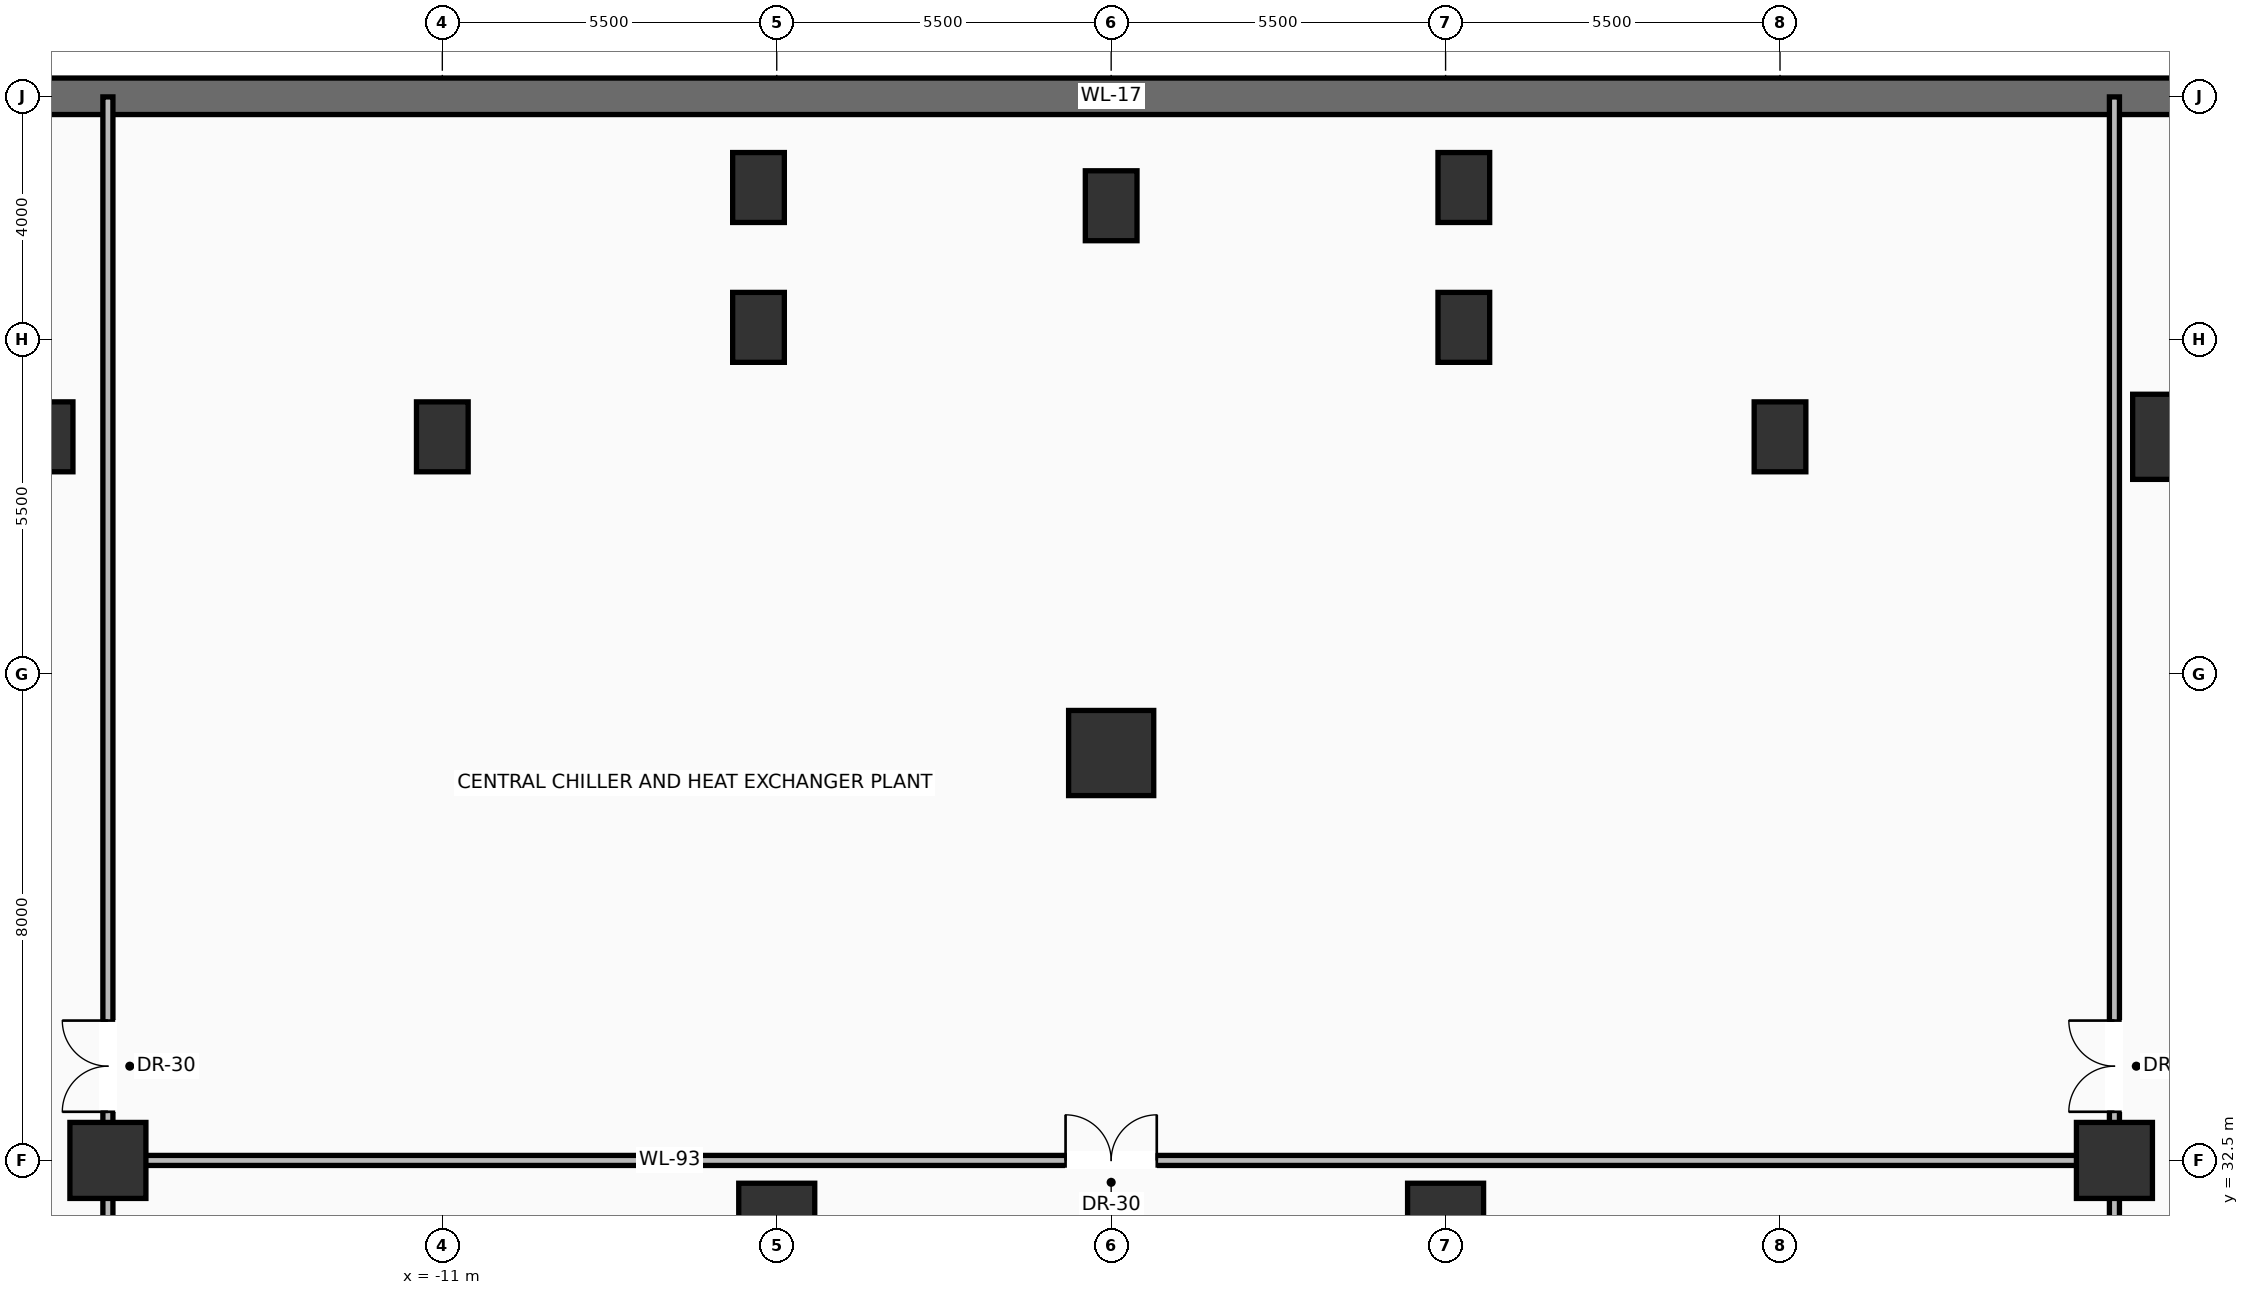
"""IFC4 building model, lengths in metres.
Left out: names, types, materials, properties, quantities, classifications, styles, units other than length and angle.
Written with IfcOpenShell. Run it as: python <this file> out.ifc"""

import sys

from ifc_helpers import new_model, si_unit, direction, frame, frame_2d, origin, origin_2d, place, context, subcontext, project, spatial, rectangle, hollow_rectangle, extrude, source, transform, mapped, element, fill, save


model = new_model("IFC4")
c1 = context("Model", 3, precision=1e-05, world=origin(), true_north=direction((0.0, 1.0)))
c2 = subcontext(c1, "Body", "Model", "MODEL_VIEW")
j1 = project(units=[si_unit("LENGTHUNIT", "METRE"), si_unit("PLANEANGLEUNIT", "RADIAN")], contexts=[c1])
p1 = place(None, origin())
s1 = spatial("IfcSite", under=j1, at=p1, CompositionType="ELEMENT")
p2 = place(p1, origin())
s2 = spatial("IfcBuilding", under=s1, at=p2, CompositionType="ELEMENT")
p3 = place(p2, frame((0.0, 0.0, -10.0)))
s3 = spatial("IfcBuildingStorey", under=s2, at=p3, CompositionType="ELEMENT", Elevation=-10.0)
p4 = place(p3, frame((32.5, 50.0, 0.0), z_axis=(0.0, 0.0, 1.0), x_axis=(-1.0, 0.0, 0.0)))
e1 = element("IfcWall", 1, at=p4, inside=s3, PredefinedType="SOLIDWALL", context=c2, shape_type="SweptSolid", body=[
    extrude(rectangle(XDim=65.0, YDim=0.6, at=frame_2d((32.5, 0.0))), origin(), (0.0, 0.0, 1.0), 4.6),
])
m1 = source(origin(), c2, "Body", "SweptSolid", [
    extrude(rectangle(XDim=0.85, YDim=1.15, at=origin_2d()), origin(), (0.0, 0.0, 1.0), 5.0),
])
for number, where, z_axis, x_axis in (
    (2, (-5.8, 46.2, 0.0), (0.0, 0.0, 1.0), (1.0, 0.0, 0.0)),
    (3, (5.8, 46.2, 0.0), (0.0, 0.0, 1.0), (1.0, 0.0, 0.0)),
    (4, (0.0, 48.2, 0.0), (0.0, 0.0, 1.0), (1.0, 0.0, 0.0)),
    (5, (-5.8, 48.5, 0.0), (0.0, 0.0, 1.0), (1.0, 0.0, 0.0)),
    (6, (5.8, 48.5, 0.0), (0.0, 0.0, 1.0), (1.0, 0.0, 0.0)),
    (7, (-11.0, 44.4, 0.0), (0.0, 0.0, 1.0), (1.0, 0.0, 0.0)),
):
    element("IfcColumn", number, at=place(p3, frame(where, z_axis=z_axis, x_axis=x_axis)), inside=s3, PredefinedType="COLUMN", context=c2, shape_type="MappedRepresentation", body=[
        mapped(m1, transform((0.0, 0.0, 0.0), scale=1.0)),
    ])
m2 = source(origin(), c2, "Body", "SweptSolid", [
    extrude(hollow_rectangle(XDim=1.4, YDim=1.4, WallThickness=0.07, at=origin_2d()), origin(), (0.0, 0.0, 1.0), 5.0),
])
p5 = place(p3, frame((0.0, 39.2, 0.0), z_axis=(0.0, 0.0, 1.0), x_axis=(1.0, 0.0, 0.0)))
e8 = element("IfcColumn", 8, at=p5, inside=s3, PredefinedType="COLUMN", context=c2, shape_type="MappedRepresentation", body=[
    mapped(m2, transform((0.0, 0.0, 0.0), scale=1.0)),
])
for number, where, z_axis, x_axis in (
    (9, (11.0, 44.4, 0.0), (0.0, 0.0, 1.0), (1.0, 0.0, 0.0)),
    (10, (-17.5, 44.4, 0.0), (0.0, 0.0, 1.0), (1.0, 0.0, 0.0)),
):
    element("IfcColumn", number, at=place(p3, frame(where, z_axis=z_axis, x_axis=x_axis)), inside=s3, PredefinedType="COLUMN", context=c2, shape_type="MappedRepresentation", body=[
        mapped(m1, transform((0.0, 0.0, 0.0), scale=1.0)),
    ])
p6 = place(p3, frame((17.5, 44.4, 0.0), z_axis=(0.0, 0.0, 1.0), x_axis=(1.0, 0.0, 0.0)))
e11 = element("IfcColumn", 11, at=p6, inside=s3, PredefinedType="COLUMN", context=c2, shape_type="MappedRepresentation", body=[
    mapped(m2, transform((0.0, 0.0, 0.0), scale=1.0)),
])
m3 = source(origin(), c2, "Body", "SweptSolid", [
    extrude(rectangle(XDim=1.25, YDim=1.25, at=origin_2d()), origin(), (0.0, 0.0, 1.0), 5.0),
])
for number, where, z_axis, x_axis in (
    (12, (-5.5, 31.5, 0.0), (0.0, 0.0, 1.0), (1.0, 0.0, 0.0)),
    (13, (5.5, 31.5, 0.0), (0.0, 0.0, 1.0), (1.0, 0.0, 0.0)),
    (14, (-16.5, 32.5, 0.0), (0.0, 0.0, 1.0), (1.0, 0.0, 0.0)),
    (15, (16.5, 32.5, 0.0), (0.0, 0.0, 1.0), (1.0, 0.0, 0.0)),
):
    element("IfcColumn", number, at=place(p3, frame(where, z_axis=z_axis, x_axis=x_axis)), inside=s3, PredefinedType="COLUMN", context=c2, shape_type="MappedRepresentation", body=[
        mapped(m3, transform((0.0, 0.0, 0.0), scale=1.0)),
    ])
p7 = place(p3, frame((-16.5, 18.85, 0.0), z_axis=(0.0, 0.0, 1.0), x_axis=(0.0, 1.0, 0.0)))
e16 = element("IfcWall", 16, at=p7, inside=s3, PredefinedType="PARTITIONING", context=c2, shape_type="SweptSolid", body=[
    extrude(rectangle(XDim=31.14, YDim=0.165, at=frame_2d((15.57, 0.0))), origin(), (0.0, 0.0, 1.0), 3.552),
])
p8 = place(p7, frame((14.45, 0.0, 0.0)))
e17 = element("IfcOpeningElement", 17, at=p8, cuts=e16, PredefinedType="OPENING", context=c2, shape_type="SweptSolid", body=[
    extrude(rectangle(XDim=1.5, YDim=2.25, at=frame_2d((0.75, 1.125))), frame((0.0, 0.093, 0.0), z_axis=(0.0, -1.0, 0.0), x_axis=(1.0, 0.0, 0.0)), (0.0, 0.0, 1.0), 0.185),
])
p9 = place(p3, frame((16.5, 18.85, 0.0), z_axis=(0.0, 0.0, 1.0), x_axis=(0.0, 1.0, 0.0)))
e18 = element("IfcWall", 18, at=p9, inside=s3, PredefinedType="PARTITIONING", context=c2, shape_type="SweptSolid", body=[
    extrude(rectangle(XDim=31.14, YDim=0.165, at=frame_2d((15.57, 0.0))), origin(), (0.0, 0.0, 1.0), 3.552),
])
p10 = place(p9, frame((14.45, 0.0, 0.0)))
e19 = element("IfcOpeningElement", 19, at=p10, cuts=e18, PredefinedType="OPENING", context=c2, shape_type="SweptSolid", body=[
    extrude(rectangle(XDim=1.5, YDim=2.25, at=frame_2d((0.75, 1.125))), frame((0.0, 0.093, 0.0), z_axis=(0.0, -1.0, 0.0), x_axis=(1.0, 0.0, 0.0)), (0.0, 0.0, 1.0), 0.185),
])
p11 = place(p3, frame((-16.5, 32.5, 0.0), z_axis=(0.0, 0.0, 1.0), x_axis=(1.0, 0.0, 0.0)))
e20 = element("IfcWall", 20, at=p11, inside=s3, PredefinedType="PARTITIONING", context=c2, shape_type="SweptSolid", body=[
    extrude(rectangle(XDim=33.0, YDim=0.165, at=frame_2d((16.5, 0.0))), origin(), (0.0, 0.0, 1.0), 3.552),
])
p12 = place(p11, frame((15.75, 0.0, 0.0)))
e21 = element("IfcOpeningElement", 21, at=p12, cuts=e20, PredefinedType="OPENING", context=c2, shape_type="SweptSolid", body=[
    extrude(rectangle(XDim=1.5, YDim=2.25, at=frame_2d((0.75, 1.125))), frame((0.0, 0.093, 0.0), z_axis=(0.0, -1.0, 0.0), x_axis=(1.0, 0.0, 0.0)), (0.0, 0.0, 1.0), 0.185),
])
m4 = source(origin(), c2, "Body", "SweptSolid", [
    extrude(rectangle(XDim=1.5, YDim=2.25, at=frame_2d((0.75, 1.125))), frame((0.0, 0.025, 0.0), z_axis=(0.0, -1.0, 0.0), x_axis=(1.0, 0.0, 0.0)), (0.0, 0.0, 1.0), 0.05),
])
p13 = place(p8, origin())
e22 = element("IfcDoor", 22, at=p13, inside=s3, OperationType="DOUBLE_DOOR_SINGLE_SWING", PredefinedType="DOOR", context=c2, shape_type="MappedRepresentation", body=[
    mapped(m4, transform((0.0, 0.0, 0.0), scale=1.0)),
])
fill(e17, e22)
p14 = place(p10, origin())
e23 = element("IfcDoor", 23, at=p14, inside=s3, OperationType="DOUBLE_DOOR_SINGLE_SWING", PredefinedType="DOOR", context=c2, shape_type="MappedRepresentation", body=[
    mapped(m4, transform((0.0, 0.0, 0.0), scale=1.0)),
])
fill(e19, e23)
p15 = place(p12, origin())
e24 = element("IfcDoor", 24, at=p15, inside=s3, OperationType="DOUBLE_DOOR_SINGLE_SWING", PredefinedType="DOOR", context=c2, shape_type="MappedRepresentation", body=[
    mapped(m4, transform((0.0, 0.0, 0.0), scale=1.0)),
])
fill(e21, e24)
save(model, sys.argv[1])
